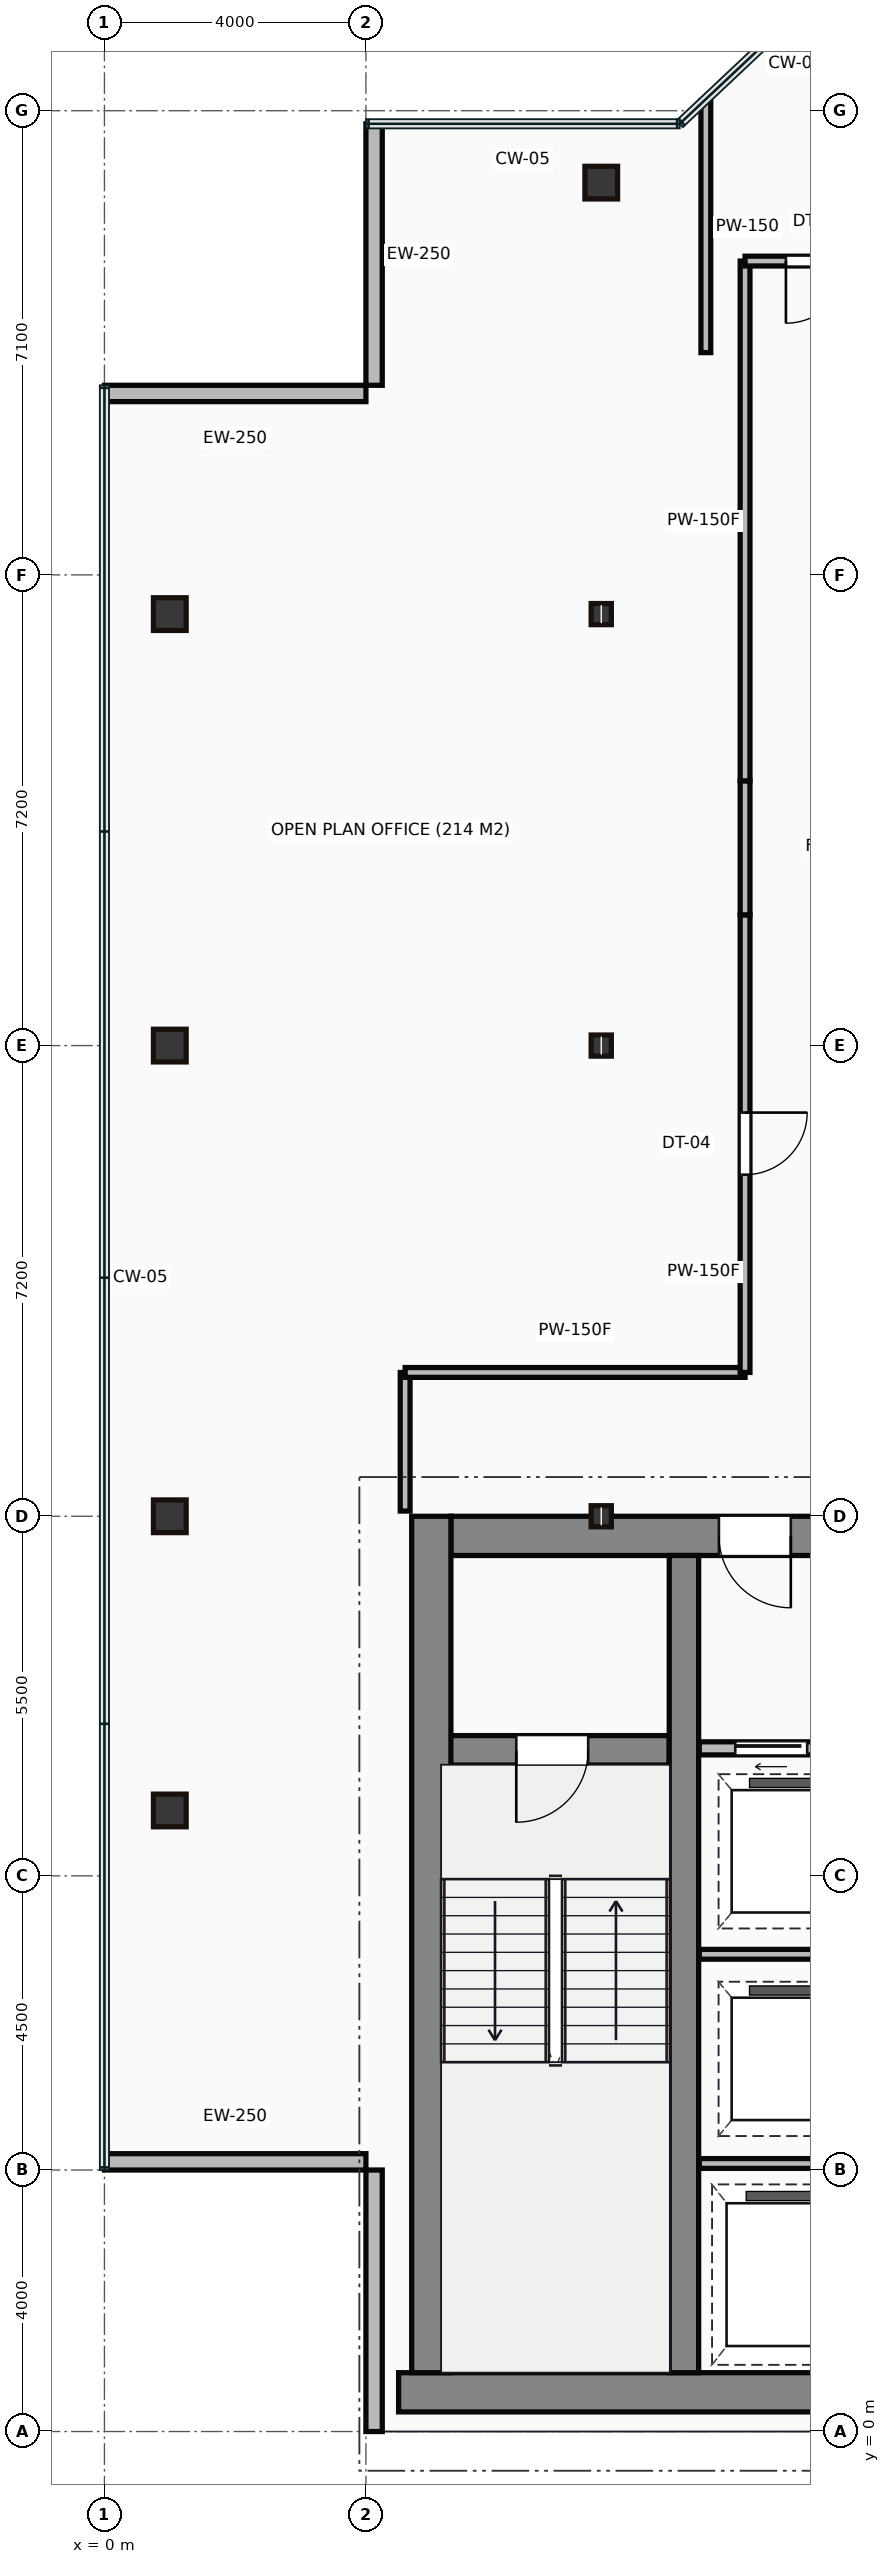
"""IFC4 building model, lengths in metres.
Left out: names, types, materials, properties, quantities, classifications, styles, units other than length and angle.
Written with IfcOpenShell. Run it as: python <this file> out.ifc"""

import sys

from ifc_helpers import new_model, si_unit, direction, frame, frame_2d, origin, origin_2d, place, context, subcontext, project, spatial, rectangle, hollow_rectangle, i_section, extrude, source, transform, mapped, element, fill, save


model = new_model("IFC4")
c1 = context("Model", 3, precision=1e-05, world=origin(), true_north=direction((0.0, 1.0)))
c2 = subcontext(c1, "Body", "Model", "MODEL_VIEW")
j1 = project(units=[si_unit("LENGTHUNIT", "METRE"), si_unit("PLANEANGLEUNIT", "RADIAN")], contexts=[c1])
p1 = place(None, origin())
s1 = spatial("IfcSite", under=j1, at=p1, CompositionType="ELEMENT")
p2 = place(p1, origin())
s2 = spatial("IfcBuilding", under=s1, at=p2, CompositionType="ELEMENT")
p3 = place(p2, frame((0.0, 0.0, 188.6)))
s3 = spatial("IfcBuildingStorey", under=s2, at=p3, CompositionType="ELEMENT", Elevation=188.6)
m1 = source(origin(), c2, "Body", "SweptSolid", [
    extrude(rectangle(XDim=29.5, YDim=0.6, at=frame_2d((14.75, 0.0))), origin(), (0.0, 0.0, 1.0), 3.65),
])
p4 = place(p3, frame((4.5, 0.6, 0.0), z_axis=(0.0, 0.0, 1.0), x_axis=(1.0, 0.0, 0.0)))
e1 = element("IfcWall", 1, at=p4, inside=s3, PredefinedType="SHEAR", context=c2, shape_type="MappedRepresentation", body=[
    mapped(m1, transform((0.0, 0.0, 0.0))),
])
m2 = source(origin(), c2, "Body", "SweptSolid", [
    extrude(rectangle(XDim=13.1, YDim=0.6, at=frame_2d((6.55, 0.0))), origin(), (0.0, 0.0, 1.0), 3.65),
])
p5 = place(p3, frame((5.0, 0.9, 0.0), z_axis=(0.0, 0.0, 1.0), x_axis=(0.0, 1.0, 0.0)))
e2 = element("IfcWall", 2, at=p5, inside=s3, PredefinedType="SHEAR", context=c2, shape_type="MappedRepresentation", body=[
    mapped(m2, transform((0.0, 0.0, 0.0))),
])
m3 = source(origin(), c2, "Body", "SweptSolid", [
    extrude(rectangle(XDim=9.1, YDim=0.6, at=frame_2d((4.55, 0.0))), origin(), (0.0, 0.0, 1.0), 3.65),
])
p6 = place(p3, frame((5.3, 13.7, 0.0), z_axis=(0.0, 0.0, 1.0), x_axis=(1.0, 0.0, 0.0)))
e3 = element("IfcWall", 3, at=p6, inside=s3, PredefinedType="SHEAR", context=c2, shape_type="MappedRepresentation", body=[
    mapped(m3, transform((0.0, 0.0, 0.0))),
])
p7 = place(p6, frame((4.1, 0.0, 0.0)))
e4 = element("IfcOpeningElement", 4, at=p7, cuts=e3, PredefinedType="OPENING", context=c2, shape_type="SweptSolid", body=[
    extrude(rectangle(XDim=1.1, YDim=2.15, at=frame_2d((0.55, 1.075))), frame((0.0, 0.31, 0.0), z_axis=(0.0, -1.0, 0.0), x_axis=(1.0, 0.0, 0.0)), (0.0, 0.0, 1.0), 0.62),
])
m4 = source(origin(), c2, "Body", "SweptSolid", [
    extrude(rectangle(XDim=12.5, YDim=0.45, at=frame_2d((6.25, 0.0))), origin(), (0.0, 0.0, 1.0), 3.65),
])
p8 = place(p3, frame((8.865, 0.9, 0.0), z_axis=(0.0, 0.0, 1.0), x_axis=(0.0, 1.0, 0.0)))
e5 = element("IfcWall", 5, at=p8, inside=s3, PredefinedType="SHEAR", context=c2, shape_type="MappedRepresentation", body=[
    mapped(m4, transform((0.0, 0.0, 0.0))),
])
m5 = source(origin(), c2, "Body", "SweptSolid", [
    extrude(rectangle(XDim=3.39, YDim=0.45, at=frame_2d((1.695, 0.0))), origin(), (0.0, 0.0, 1.0), 3.65),
])
p9 = place(p3, frame((5.25, 10.42, 0.0), z_axis=(0.0, 0.0, 1.0), x_axis=(1.0, 0.0, 0.0)))
e6 = element("IfcWall", 6, at=p9, inside=s3, PredefinedType="SHEAR", context=c2, shape_type="MappedRepresentation", body=[
    mapped(m5, transform((0.0, 0.0, 0.0))),
])
p10 = place(p9, frame((1.05, 0.0, 0.0)))
e7 = element("IfcOpeningElement", 7, at=p10, cuts=e6, PredefinedType="OPENING", context=c2, shape_type="SweptSolid", body=[
    extrude(rectangle(XDim=1.1, YDim=2.15, at=frame_2d((0.55, 1.075))), frame((0.0, 0.235, 0.0), z_axis=(0.0, -1.0, 0.0), x_axis=(1.0, 0.0, 0.0)), (0.0, 0.0, 1.0), 0.47),
])
m6 = source(origin(), c2, "Body", "SweptSolid", [
    extrude(hollow_rectangle(XDim=0.5, YDim=0.5, WallThickness=0.022, at=origin_2d()), origin(), (0.0, 0.0, 1.0), 3.65),
])
for number, where, z_axis, x_axis in (
    (8, (1.0, 9.5, 0.0), (0.0, 0.0, 1.0), (1.0, 0.0, 0.0)),
    (9, (1.0, 14.0, 0.0), (0.0, 0.0, 1.0), (1.0, 0.0, 0.0)),
    (10, (1.0, 21.2, 0.0), (0.0, 0.0, 1.0), (1.0, 0.0, 0.0)),
    (11, (1.0, 27.8, 0.0), (0.0, 0.0, 1.0), (1.0, 0.0, 0.0)),
):
    element("IfcColumn", number, at=place(p3, frame(where, z_axis=z_axis, x_axis=x_axis)), inside=s3, PredefinedType="COLUMN", context=c2, shape_type="MappedRepresentation", body=[
        mapped(m6, transform((0.0, 0.0, 0.0))),
    ])
m7 = source(origin(), c2, "Body", "SweptSolid", [
    extrude(i_section(OverallWidth=0.309, OverallDepth=0.323, WebThickness=0.014, FlangeThickness=0.023, at=origin_2d()), origin(), (0.0, 0.0, 1.0), 3.65),
])
for number, where, z_axis, x_axis in (
    (12, (7.6, 14.0, 0.0), (0.0, 0.0, 1.0), (1.0, 0.0, 0.0)),
    (13, (7.6, 21.2, 0.0), (0.0, 0.0, 1.0), (1.0, 0.0, 0.0)),
    (14, (7.6, 27.8, 0.0), (0.0, 0.0, 1.0), (1.0, 0.0, 0.0)),
):
    element("IfcColumn", number, at=place(p3, frame(where, z_axis=z_axis, x_axis=x_axis)), inside=s3, PredefinedType="COLUMN", context=c2, shape_type="MappedRepresentation", body=[
        mapped(m7, transform((0.0, 0.0, 0.0))),
    ])
p11 = place(p3, frame((7.6, 34.4, 0.0), z_axis=(0.0, 0.0, 1.0), x_axis=(1.0, 0.0, 0.0)))
e15 = element("IfcColumn", 15, at=p11, inside=s3, PredefinedType="COLUMN", context=c2, shape_type="MappedRepresentation", body=[
    mapped(m6, transform((0.0, 0.0, 0.0))),
])
m8 = source(origin(), c2, "Body", "SweptSolid", [
    extrude(rectangle(XDim=4.0, YDim=0.25, at=frame_2d((2.0, 0.0))), origin(), (0.0, 0.0, 1.0), 3.4),
])
for number, where, z_axis, x_axis in (
    (16, (4.125, 35.3, 0.0), (0.0, 0.0, 1.0), (0.0, -1.0, 0.0)),
    (17, (4.0, 31.175, 0.0), (0.0, 0.0, 1.0), (-1.0, 0.0, 0.0)),
    (18, (0.0, 4.125, 0.0), (0.0, 0.0, 1.0), (1.0, 0.0, 0.0)),
    (19, (4.125, 4.0, 0.0), (0.0, 0.0, 1.0), (0.0, -1.0, 0.0)),
):
    element("IfcWall", number, at=place(p3, frame(where, z_axis=z_axis, x_axis=x_axis)), inside=s3, PredefinedType="STANDARD", context=c2, shape_type="MappedRepresentation", body=[
        mapped(m8, transform((0.0, 0.0, 0.0))),
    ])
m9 = source(origin(), c2, "Body", "SweptSolid", [
    extrude(rectangle(XDim=2.35, YDim=0.2, at=frame_2d((1.175, 0.0))), origin(), (0.0, 0.0, 1.0), 3.4),
])
p12 = place(p3, frame((9.1, 10.45, 0.0), z_axis=(0.0, 0.0, 1.0), x_axis=(1.0, 0.0, 0.0)))
e20 = element("IfcWall", 20, at=p12, inside=s3, PredefinedType="PARTITIONING", context=c2, shape_type="MappedRepresentation", body=[
    mapped(m9, transform((0.0, 0.0, 0.0))),
])
p13 = place(p12, frame((0.55, 0.0, 0.0)))
e21 = element("IfcOpeningElement", 21, at=p13, cuts=e20, PredefinedType="OPENING", context=c2, shape_type="SweptSolid", body=[
    extrude(rectangle(XDim=1.1, YDim=2.15, at=frame_2d((0.55, 1.075))), frame((0.0, 0.11, 0.0), z_axis=(0.0, -1.0, 0.0), x_axis=(1.0, 0.0, 0.0)), (0.0, 0.0, 1.0), 0.22),
])
m10 = source(origin(), c2, "Body", "SweptSolid", [
    extrude(rectangle(XDim=2.4, YDim=0.15, at=frame_2d((1.2, 0.0))), origin(), (0.0, 0.0, 1.0), 3.4),
])
for number, where, z_axis, x_axis in (
    (22, (9.1, 4.1, 0.0), (0.0, 0.0, 1.0), (1.0, 0.0, 0.0)),
    (23, (9.1, 7.3, 0.0), (0.0, 0.0, 1.0), (1.0, 0.0, 0.0)),
):
    element("IfcWall", number, at=place(p3, frame(where, z_axis=z_axis, x_axis=x_axis)), inside=s3, PredefinedType="PARTITIONING", context=c2, shape_type="MappedRepresentation", body=[
        mapped(m10, transform((0.0, 0.0, 0.0))),
    ])
m11 = source(origin(), c2, "Body", "SweptSolid", [
    extrude(rectangle(XDim=2.12, YDim=0.15, at=frame_2d((1.06, 0.0))), origin(), (0.0, 0.0, 1.0), 3.4),
])
p14 = place(p3, frame((4.6, 14.08, 0.0), z_axis=(0.0, 0.0, 1.0), x_axis=(0.0, 1.0, 0.0)))
e24 = element("IfcWall", 24, at=p14, inside=s3, PredefinedType="PARTITIONING", context=c2, shape_type="MappedRepresentation", body=[
    mapped(m11, transform((0.0, 0.0, 0.0))),
])
m12 = source(origin(), c2, "Body", "SweptSolid", [
    extrude(rectangle(XDim=5.2, YDim=0.15, at=frame_2d((2.6, 0.0))), origin(), (0.0, 0.0, 1.0), 3.4),
])
p15 = place(p3, frame((4.6, 16.2, 0.0), z_axis=(0.0, 0.0, 1.0), x_axis=(1.0, 0.0, 0.0)))
e25 = element("IfcWall", 25, at=p15, inside=s3, PredefinedType="PARTITIONING", context=c2, shape_type="MappedRepresentation", body=[
    mapped(m12, transform((0.0, 0.0, 0.0))),
])
m13 = source(origin(), c2, "Body", "SweptSolid", [
    extrude(rectangle(XDim=7.0, YDim=0.15, at=frame_2d((3.5, 0.0))), origin(), (0.0, 0.0, 1.0), 3.4),
])
p16 = place(p3, frame((9.8, 16.2, 0.0), z_axis=(0.0, 0.0, 1.0), x_axis=(0.0, 1.0, 0.0)))
e26 = element("IfcWall", 26, at=p16, inside=s3, PredefinedType="PARTITIONING", context=c2, shape_type="MappedRepresentation", body=[
    mapped(m13, transform((0.0, 0.0, 0.0))),
])
p17 = place(p16, frame((3.025, 0.0, 0.0)))
e27 = element("IfcOpeningElement", 27, at=p17, cuts=e26, PredefinedType="OPENING", context=c2, shape_type="SweptSolid", body=[
    extrude(rectangle(XDim=0.95, YDim=2.15, at=frame_2d((0.475, 1.075))), frame((0.0, 0.085, 0.0), z_axis=(0.0, -1.0, 0.0), x_axis=(1.0, 0.0, 0.0)), (0.0, 0.0, 1.0), 0.17),
])
m14 = source(origin(), c2, "Body", "SweptSolid", [
    extrude(rectangle(XDim=2.05, YDim=0.15, at=frame_2d((1.025, 0.0))), origin(), (0.0, 0.0, 1.0), 3.4),
])
p18 = place(p3, frame((9.8, 23.2, 0.0), z_axis=(0.0, 0.0, 1.0), x_axis=(0.0, 1.0, 0.0)))
e28 = element("IfcWall", 28, at=p18, inside=s3, PredefinedType="PARTITIONING", context=c2, shape_type="MappedRepresentation", body=[
    mapped(m14, transform((0.0, 0.0, 0.0))),
])
m15 = source(origin(), c2, "Body", "SweptSolid", [
    extrude(rectangle(XDim=7.95, YDim=0.15, at=frame_2d((3.975, 0.0))), origin(), (0.0, 0.0, 1.0), 3.4),
])
p19 = place(p3, frame((9.8, 25.25, 0.0), z_axis=(0.0, 0.0, 1.0), x_axis=(0.0, 1.0, 0.0)))
e29 = element("IfcWall", 29, at=p19, inside=s3, PredefinedType="PARTITIONING", context=c2, shape_type="MappedRepresentation", body=[
    mapped(m15, transform((0.0, 0.0, 0.0))),
])
m16 = source(origin(), c2, "Body", "SweptSolid", [
    extrude(rectangle(XDim=2.2, YDim=0.15, at=frame_2d((1.1, 0.0))), origin(), (0.0, 0.0, 1.0), 3.4),
])
p20 = place(p3, frame((9.8, 33.2, 0.0), z_axis=(0.0, 0.0, 1.0), x_axis=(1.0, 0.0, 0.0)))
e30 = element("IfcWall", 30, at=p20, inside=s3, PredefinedType="PARTITIONING", context=c2, shape_type="MappedRepresentation", body=[
    mapped(m16, transform((0.0, 0.0, 0.0))),
])
p21 = place(p20, frame((0.625, 0.0, 0.0)))
e31 = element("IfcOpeningElement", 31, at=p21, cuts=e30, PredefinedType="OPENING", context=c2, shape_type="SweptSolid", body=[
    extrude(rectangle(XDim=0.95, YDim=2.15, at=frame_2d((0.475, 1.075))), frame((0.0, 0.085, 0.0), z_axis=(0.0, -1.0, 0.0), x_axis=(1.0, 0.0, 0.0)), (0.0, 0.0, 1.0), 0.17),
])
m17 = source(origin(), c2, "Body", "SweptSolid", [
    extrude(rectangle(XDim=3.849, YDim=0.15, at=frame_2d((1.925, 0.0))), origin(), (0.0, 0.0, 1.0), 3.4),
])
p22 = place(p3, frame((9.2, 35.649, 0.0), z_axis=(0.0, 0.0, 1.0), x_axis=(0.0, -1.0, 0.0)))
e32 = element("IfcWall", 32, at=p22, inside=s3, PredefinedType="PARTITIONING", context=c2, shape_type="MappedRepresentation", body=[
    mapped(m17, transform((0.0, 0.0, 0.0))),
])
m18 = source(origin(), c2, "Body", "SweptSolid", [
    extrude(rectangle(XDim=1.1, YDim=2.15, at=frame_2d((0.55, 1.075))), frame((0.0, 0.025, 0.0), z_axis=(0.0, -1.0, 0.0), x_axis=(1.0, 0.0, 0.0)), (0.0, 0.0, 1.0), 0.05),
])
p23 = place(p10, frame((1.1, 0.0, 0.0), z_axis=(0.0, 0.0, 1.0), x_axis=(-1.0, 0.0, 0.0)))
e33 = element("IfcDoor", 33, at=p23, inside=s3, OperationType="SINGLE_SWING_LEFT", PredefinedType="DOOR", context=c2, shape_type="MappedRepresentation", body=[
    mapped(m18, transform((0.0, 0.0, 0.0))),
])
fill(e7, e33)
p24 = place(p7, origin())
e34 = element("IfcDoor", 34, at=p24, inside=s3, OperationType="SINGLE_SWING_RIGHT", PredefinedType="DOOR", context=c2, shape_type="MappedRepresentation", body=[
    mapped(m18, transform((0.0, 0.0, 0.0))),
])
fill(e4, e34)
p25 = place(p13, origin())
e35 = element("IfcDoor", 35, at=p25, inside=s3, OperationType="SLIDING_TO_LEFT", PredefinedType="DOOR", context=c2, shape_type="MappedRepresentation", body=[
    mapped(m18, transform((0.0, 0.0, 0.0))),
])
fill(e21, e35)
m19 = source(origin(), c2, "Body", "SweptSolid", [
    extrude(rectangle(XDim=0.95, YDim=2.15, at=frame_2d((0.475, 1.075))), frame((0.0, 0.025, 0.0), z_axis=(0.0, -1.0, 0.0), x_axis=(1.0, 0.0, 0.0)), (0.0, 0.0, 1.0), 0.05),
])
p26 = place(p17, origin())
e36 = element("IfcDoor", 36, at=p26, inside=s3, OperationType="SINGLE_SWING_RIGHT", PredefinedType="DOOR", context=c2, shape_type="MappedRepresentation", body=[
    mapped(m19, transform((0.0, 0.0, 0.0))),
])
fill(e27, e36)
p27 = place(p21, origin())
e37 = element("IfcDoor", 37, at=p27, inside=s3, OperationType="SINGLE_SWING_LEFT", PredefinedType="DOOR", context=c2, shape_type="MappedRepresentation", body=[
    mapped(m19, transform((0.0, 0.0, 0.0))),
])
fill(e31, e37)
save(model, sys.argv[1])
